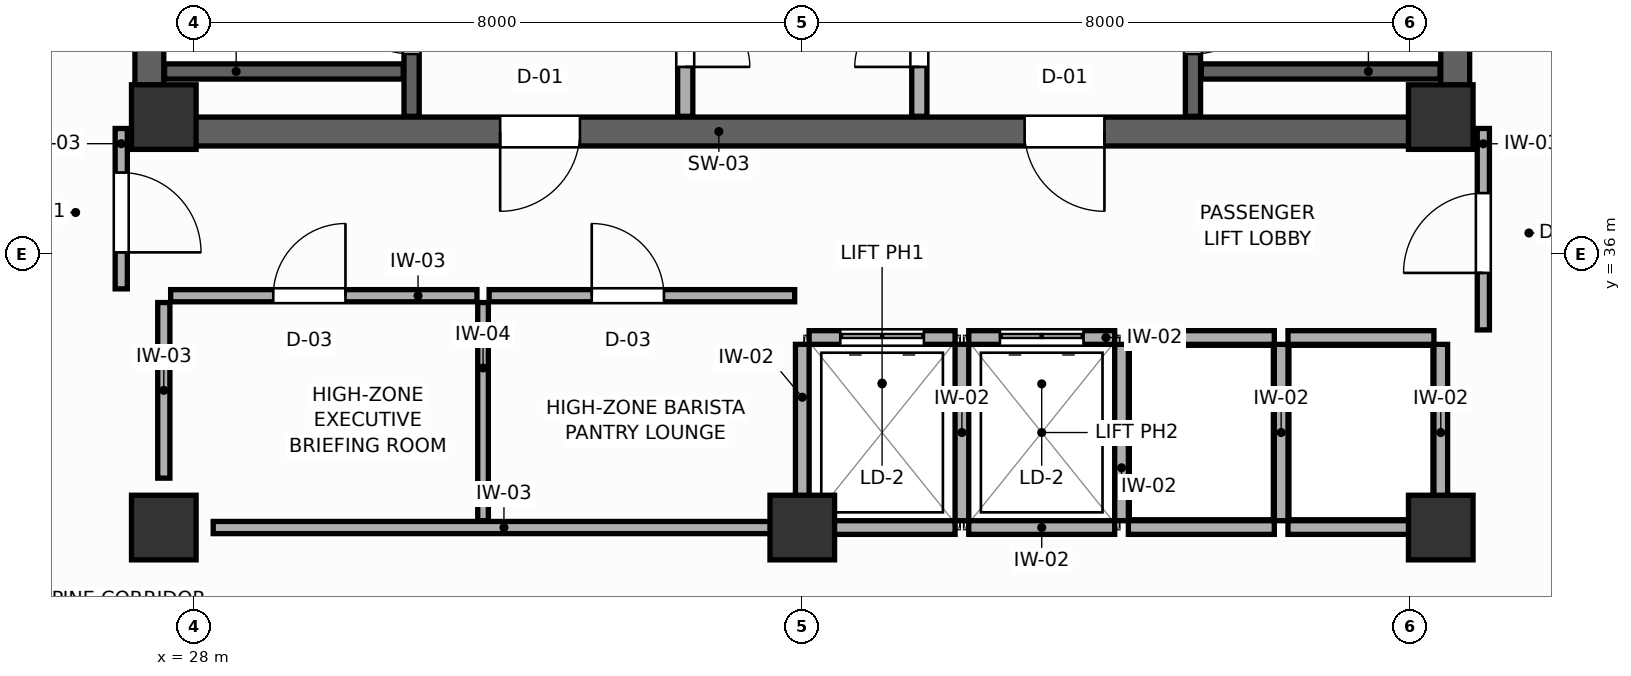
"""IFC4 building model, lengths in metres.
Left out: names, types, materials, properties, quantities, classifications, styles, units other than length and angle.
Written with IfcOpenShell. Run it as: python <this file> out.ifc"""

import sys

from ifc_helpers import new_model, si_unit, direction, frame, frame_2d, origin, origin_2d, place, context, subcontext, project, spatial, rectangle, extrude, source, transform, mapped, element, fill, save


model = new_model("IFC4")
c1 = context("Model", 3, precision=1e-05, world=origin(), true_north=direction((0.0, 1.0)))
c2 = subcontext(c1, "Body", "Model", "MODEL_VIEW")
j1 = project(units=[si_unit("LENGTHUNIT", "METRE"), si_unit("PLANEANGLEUNIT", "RADIAN")], contexts=[c1])
p1 = place(None, origin())
s1 = spatial("IfcSite", under=j1, at=p1, CompositionType="ELEMENT")
p2 = place(p1, origin())
s2 = spatial("IfcBuilding", under=s1, at=p2, CompositionType="ELEMENT")
p3 = place(p2, frame((0.0, 0.0, 253.8)))
s3 = spatial("IfcBuildingStorey", under=s2, at=p3, CompositionType="ELEMENT", Elevation=253.8)
p4 = place(p3, frame((27.22, 37.61, 0.0), z_axis=(0.0, 0.0, 1.0), x_axis=(1.0, 0.0, 0.0)))
e1 = element("IfcWall", 1, at=p4, inside=s3, PredefinedType="SHEAR", context=c2, shape_type="SweptSolid", body=[
    extrude(rectangle(XDim=17.56, YDim=0.38, at=frame_2d((8.78, 0.0))), origin(), (0.0, 0.0, 1.0), 3.6),
])
p5 = place(p4, frame((4.805, 0.0, 0.0)))
e2 = element("IfcOpeningElement", 2, at=p5, cuts=e1, PredefinedType="OPENING", context=c2, shape_type="SweptSolid", body=[
    extrude(rectangle(XDim=1.05, YDim=2.1, at=frame_2d((0.525, 1.05))), frame((0.0, 0.2, 0.0), z_axis=(0.0, -1.0, 0.0), x_axis=(1.0, 0.0, 0.0)), (0.0, 0.0, 1.0), 0.4),
])
p6 = place(p4, frame((11.705, 0.0, 0.0)))
e3 = element("IfcOpeningElement", 3, at=p6, cuts=e1, PredefinedType="OPENING", context=c2, shape_type="SweptSolid", body=[
    extrude(rectangle(XDim=1.05, YDim=2.1, at=frame_2d((0.525, 1.05))), frame((0.0, 0.2, 0.0), z_axis=(0.0, -1.0, 0.0), x_axis=(1.0, 0.0, 0.0)), (0.0, 0.0, 1.0), 0.4),
])
for number, where, z_axis, x_axis in (
    (4, (27.41, 37.8, 0.0), (0.0, 0.0, 1.0), (0.0, 1.0, 0.0)),
    (5, (44.59, 37.8, 0.0), (0.0, 0.0, 1.0), (0.0, 1.0, 0.0)),
):
    element("IfcWall", number, at=place(p3, frame(where, z_axis=z_axis, x_axis=x_axis)), inside=s3, PredefinedType="SHEAR", context=c2, shape_type="SweptSolid", body=[
        extrude(rectangle(XDim=9.0, YDim=0.38, at=frame_2d((4.5, 0.0))), origin(), (0.0, 0.0, 1.0), 3.6),
    ])
m1 = source(origin(), c2, "Body", "SweptSolid", [
    extrude(rectangle(XDim=0.85, YDim=0.85, at=origin_2d()), origin(), (0.0, 0.0, 1.0), 3.6),
])
for number, where, z_axis, x_axis in (
    (6, (27.6, 37.8, 0.0), (0.0, 0.0, 1.0), (1.0, 0.0, 0.0)),
    (7, (44.4, 37.8, 0.0), (0.0, 0.0, 1.0), (1.0, 0.0, 0.0)),
    (8, (27.6, 32.4, 0.0), (0.0, 0.0, 1.0), (1.0, 0.0, 0.0)),
    (9, (44.4, 32.4, 0.0), (0.0, 0.0, 1.0), (1.0, 0.0, 0.0)),
    (10, (36.0, 32.4, 0.0), (0.0, 0.0, 1.0), (1.0, 0.0, 0.0)),
):
    element("IfcColumn", number, at=place(p3, frame(where, z_axis=z_axis, x_axis=x_axis)), inside=s3, PredefinedType="COLUMN", context=c2, shape_type="MappedRepresentation", body=[
        mapped(m1, transform((0.0, 0.0, 0.0), scale=1.0)),
    ])
p7 = place(p3, frame((30.86, 37.81, 0.0), z_axis=(0.0, 0.0, 1.0), x_axis=(0.0, 1.0, 0.0)))
e11 = element("IfcWall", 11, at=p7, inside=s3, PredefinedType="SHEAR", context=c2, shape_type="SweptSolid", body=[
    extrude(rectangle(XDim=8.98, YDim=0.2, at=frame_2d((4.49, 0.0))), origin(), (0.0, 0.0, 1.0), 3.6),
])
p8 = place(p7, frame((0.82, 0.0, 0.0)))
e12 = element("IfcOpeningElement", 12, at=p8, cuts=e11, PredefinedType="OPENING", context=c2, shape_type="SweptSolid", body=[
    extrude(rectangle(XDim=1.05, YDim=2.1, at=frame_2d((0.525, 1.05))), frame((0.0, 0.11, 0.0), z_axis=(0.0, -1.0, 0.0), x_axis=(1.0, 0.0, 0.0)), (0.0, 0.0, 1.0), 0.22),
])
p9 = place(p3, frame((27.61, 38.4, 0.0), z_axis=(0.0, 0.0, 1.0), x_axis=(1.0, 0.0, 0.0)))
e13 = element("IfcWall", 13, at=p9, inside=s3, PredefinedType="SHEAR", context=c2, shape_type="SweptSolid", body=[
    extrude(rectangle(XDim=3.14, YDim=0.2, at=frame_2d((1.57, 0.0))), origin(), (0.0, 0.0, 1.0), 3.6),
])
p10 = place(p3, frame((41.14, 37.81, 0.0), z_axis=(0.0, 0.0, 1.0), x_axis=(0.0, 1.0, 0.0)))
e14 = element("IfcWall", 14, at=p10, inside=s3, PredefinedType="SHEAR", context=c2, shape_type="SweptSolid", body=[
    extrude(rectangle(XDim=8.98, YDim=0.2, at=frame_2d((4.49, 0.0))), origin(), (0.0, 0.0, 1.0), 3.6),
])
p11 = place(p10, frame((0.82, 0.0, 0.0)))
e15 = element("IfcOpeningElement", 15, at=p11, cuts=e14, PredefinedType="OPENING", context=c2, shape_type="SweptSolid", body=[
    extrude(rectangle(XDim=1.05, YDim=2.1, at=frame_2d((0.525, 1.05))), frame((0.0, 0.11, 0.0), z_axis=(0.0, -1.0, 0.0), x_axis=(1.0, 0.0, 0.0)), (0.0, 0.0, 1.0), 0.22),
])
p12 = place(p3, frame((41.25, 38.4, 0.0), z_axis=(0.0, 0.0, 1.0), x_axis=(1.0, 0.0, 0.0)))
e16 = element("IfcWall", 16, at=p12, inside=s3, PredefinedType="SHEAR", context=c2, shape_type="SweptSolid", body=[
    extrude(rectangle(XDim=3.14, YDim=0.2, at=frame_2d((1.57, 0.0))), origin(), (0.0, 0.0, 1.0), 3.6),
])
p13 = place(p3, frame((34.46, 37.81, 0.0), z_axis=(0.0, 0.0, 1.0), x_axis=(0.0, 1.0, 0.0)))
e17 = element("IfcWall", 17, at=p13, inside=s3, PredefinedType="PARTITIONING", context=c2, shape_type="SweptSolid", body=[
    extrude(rectangle(XDim=8.98, YDim=0.2, at=frame_2d((4.49, 0.0))), origin(), (0.0, 0.0, 1.0), 3.41),
])
p14 = place(p13, frame((0.65, 0.0, 0.0)))
e18 = element("IfcOpeningElement", 18, at=p14, cuts=e17, PredefinedType="OPENING", context=c2, shape_type="SweptSolid", body=[
    extrude(rectangle(XDim=0.85, YDim=2.05, at=frame_2d((0.425, 1.025))), frame((0.0, 0.11, 0.0), z_axis=(0.0, -1.0, 0.0), x_axis=(1.0, 0.0, 0.0)), (0.0, 0.0, 1.0), 0.22),
])
p15 = place(p3, frame((37.54, 37.81, 0.0), z_axis=(0.0, 0.0, 1.0), x_axis=(0.0, 1.0, 0.0)))
e19 = element("IfcWall", 19, at=p15, inside=s3, PredefinedType="PARTITIONING", context=c2, shape_type="SweptSolid", body=[
    extrude(rectangle(XDim=8.98, YDim=0.2, at=frame_2d((4.49, 0.0))), origin(), (0.0, 0.0, 1.0), 3.41),
])
p16 = place(p15, frame((0.65, 0.0, 0.0)))
e20 = element("IfcOpeningElement", 20, at=p16, cuts=e19, PredefinedType="OPENING", context=c2, shape_type="SweptSolid", body=[
    extrude(rectangle(XDim=0.85, YDim=2.05, at=frame_2d((0.425, 1.025))), frame((0.0, 0.11, 0.0), z_axis=(0.0, -1.0, 0.0), x_axis=(1.0, 0.0, 0.0)), (0.0, 0.0, 1.0), 0.22),
])
p17 = place(p3, frame((36.09, 34.9, 0.0), z_axis=(0.0, 0.0, 1.0), x_axis=(1.0, 0.0, 0.0)))
e21 = element("IfcWall", 21, at=p17, inside=s3, PredefinedType="PARTITIONING", context=c2, shape_type="SweptSolid", body=[
    extrude(rectangle(XDim=1.92, YDim=0.18, at=frame_2d((0.96, 0.0))), origin(), (0.0, 0.0, 1.0), 3.41),
])
p18 = place(p17, frame((0.41, 0.0, 0.0)))
e22 = element("IfcOpeningElement", 22, at=p18, cuts=e21, PredefinedType="OPENING", context=c2, shape_type="SweptSolid", body=[
    extrude(rectangle(XDim=1.1, YDim=2.1, at=frame_2d((0.55, 1.05))), frame((0.0, 0.1, 0.0), z_axis=(0.0, -1.0, 0.0), x_axis=(1.0, 0.0, 0.0)), (0.0, 0.0, 1.0), 0.2),
])
p19 = place(p3, frame((36.09, 32.4, 0.0), z_axis=(0.0, 0.0, 1.0), x_axis=(1.0, 0.0, 0.0)))
e23 = element("IfcWall", 23, at=p19, inside=s3, PredefinedType="PARTITIONING", context=c2, shape_type="SweptSolid", body=[
    extrude(rectangle(XDim=1.92, YDim=0.18, at=frame_2d((0.96, 0.0))), origin(), (0.0, 0.0, 1.0), 2.17),
])
p20 = place(p3, frame((36.0, 32.49, 0.0), z_axis=(0.0, 0.0, 1.0), x_axis=(0.0, 1.0, 0.0)))
e24 = element("IfcWall", 24, at=p20, inside=s3, PredefinedType="PARTITIONING", context=c2, shape_type="SweptSolid", body=[
    extrude(rectangle(XDim=2.32, YDim=0.18, at=frame_2d((1.16, 0.0))), origin(), (0.0, 0.0, 1.0), 3.41),
])
p21 = place(p3, frame((38.19, 34.9, 0.0), z_axis=(0.0, 0.0, 1.0), x_axis=(1.0, 0.0, 0.0)))
e25 = element("IfcWall", 25, at=p21, inside=s3, PredefinedType="PARTITIONING", context=c2, shape_type="SweptSolid", body=[
    extrude(rectangle(XDim=1.92, YDim=0.18, at=frame_2d((0.96, 0.0))), origin(), (0.0, 0.0, 1.0), 3.41),
])
p22 = place(p21, frame((0.41, 0.0, 0.0)))
e26 = element("IfcOpeningElement", 26, at=p22, cuts=e25, PredefinedType="OPENING", context=c2, shape_type="SweptSolid", body=[
    extrude(rectangle(XDim=1.1, YDim=2.1, at=frame_2d((0.55, 1.05))), frame((0.0, 0.1, 0.0), z_axis=(0.0, -1.0, 0.0), x_axis=(1.0, 0.0, 0.0)), (0.0, 0.0, 1.0), 0.2),
])
p23 = place(p3, frame((38.19, 32.4, 0.0), z_axis=(0.0, 0.0, 1.0), x_axis=(1.0, 0.0, 0.0)))
e27 = element("IfcWall", 27, at=p23, inside=s3, PredefinedType="PARTITIONING", context=c2, shape_type="SweptSolid", body=[
    extrude(rectangle(XDim=1.92, YDim=0.18, at=frame_2d((0.96, 0.0))), origin(), (0.0, 0.0, 1.0), 2.17),
])
p24 = place(p3, frame((38.1, 32.49, 0.0), z_axis=(0.0, 0.0, 1.0), x_axis=(0.0, 1.0, 0.0)))
e28 = element("IfcWall", 28, at=p24, inside=s3, PredefinedType="PARTITIONING", context=c2, shape_type="SweptSolid", body=[
    extrude(rectangle(XDim=2.32, YDim=0.18, at=frame_2d((1.16, 0.0))), origin(), (0.0, 0.0, 1.0), 3.41),
])
p25 = place(p3, frame((40.29, 34.9, 0.0), z_axis=(0.0, 0.0, 1.0), x_axis=(1.0, 0.0, 0.0)))
e29 = element("IfcWall", 29, at=p25, inside=s3, PredefinedType="PARTITIONING", context=c2, shape_type="SweptSolid", body=[
    extrude(rectangle(XDim=1.92, YDim=0.18, at=frame_2d((0.96, 0.0))), origin(), (0.0, 0.0, 1.0), 3.41),
])
p26 = place(p3, frame((40.29, 32.4, 0.0), z_axis=(0.0, 0.0, 1.0), x_axis=(1.0, 0.0, 0.0)))
e30 = element("IfcWall", 30, at=p26, inside=s3, PredefinedType="PARTITIONING", context=c2, shape_type="SweptSolid", body=[
    extrude(rectangle(XDim=1.92, YDim=0.18, at=frame_2d((0.96, 0.0))), origin(), (0.0, 0.0, 1.0), 2.17),
])
p27 = place(p3, frame((40.2, 32.49, 0.0), z_axis=(0.0, 0.0, 1.0), x_axis=(0.0, 1.0, 0.0)))
e31 = element("IfcWall", 31, at=p27, inside=s3, PredefinedType="PARTITIONING", context=c2, shape_type="SweptSolid", body=[
    extrude(rectangle(XDim=2.32, YDim=0.18, at=frame_2d((1.16, 0.0))), origin(), (0.0, 0.0, 1.0), 3.41),
])
p28 = place(p3, frame((42.39, 34.9, 0.0), z_axis=(0.0, 0.0, 1.0), x_axis=(1.0, 0.0, 0.0)))
e32 = element("IfcWall", 32, at=p28, inside=s3, PredefinedType="PARTITIONING", context=c2, shape_type="SweptSolid", body=[
    extrude(rectangle(XDim=1.92, YDim=0.18, at=frame_2d((0.96, 0.0))), origin(), (0.0, 0.0, 1.0), 3.41),
])
p29 = place(p3, frame((42.39, 32.4, 0.0), z_axis=(0.0, 0.0, 1.0), x_axis=(1.0, 0.0, 0.0)))
e33 = element("IfcWall", 33, at=p29, inside=s3, PredefinedType="PARTITIONING", context=c2, shape_type="SweptSolid", body=[
    extrude(rectangle(XDim=1.92, YDim=0.18, at=frame_2d((0.96, 0.0))), origin(), (0.0, 0.0, 1.0), 2.17),
])
for number, where, z_axis, x_axis in (
    (34, (42.3, 32.49, 0.0), (0.0, 0.0, 1.0), (0.0, 1.0, 0.0)),
    (35, (44.4, 32.49, 0.0), (0.0, 0.0, 1.0), (0.0, 1.0, 0.0)),
):
    element("IfcWall", number, at=place(p3, frame(where, z_axis=z_axis, x_axis=x_axis)), inside=s3, PredefinedType="PARTITIONING", context=c2, shape_type="SweptSolid", body=[
        extrude(rectangle(XDim=2.32, YDim=0.18, at=frame_2d((1.16, 0.0))), origin(), (0.0, 0.0, 1.0), 3.41),
    ])
p30 = place(p3, frame((28.25, 32.4, 0.0), z_axis=(0.0, 0.0, 1.0), x_axis=(1.0, 0.0, 0.0)))
e36 = element("IfcWall", 36, at=p30, inside=s3, PredefinedType="PARTITIONING", context=c2, shape_type="SweptSolid", body=[
    extrude(rectangle(XDim=7.65, YDim=0.16, at=frame_2d((3.825, 0.0))), origin(), (0.0, 0.0, 1.0), 2.17),
])
p31 = place(p3, frame((27.6, 33.05, 0.0), z_axis=(0.0, 0.0, 1.0), x_axis=(0.0, 1.0, 0.0)))
e37 = element("IfcWall", 37, at=p31, inside=s3, PredefinedType="PARTITIONING", context=c2, shape_type="SweptSolid", body=[
    extrude(rectangle(XDim=2.31, YDim=0.16, at=frame_2d((1.155, 0.0))), origin(), (0.0, 0.0, 1.0), 3.41),
])
p32 = place(p3, frame((31.8, 32.49, 0.0), z_axis=(0.0, 0.0, 1.0), x_axis=(0.0, 1.0, 0.0)))
e38 = element("IfcWall", 38, at=p32, inside=s3, PredefinedType="PARTITIONING", context=c2, shape_type="SweptSolid", body=[
    extrude(rectangle(XDim=2.87, YDim=0.14, at=frame_2d((1.435, 0.0))), origin(), (0.0, 0.0, 1.0), 3.41),
])
p33 = place(p3, frame((27.69, 35.45, 0.0), z_axis=(0.0, 0.0, 1.0), x_axis=(1.0, 0.0, 0.0)))
e39 = element("IfcWall", 39, at=p33, inside=s3, PredefinedType="PARTITIONING", context=c2, shape_type="SweptSolid", body=[
    extrude(rectangle(XDim=4.03, YDim=0.16, at=frame_2d((2.015, 0.0))), origin(), (0.0, 0.0, 1.0), 3.41),
])
p34 = place(p33, frame((1.35, 0.0, 0.0)))
e40 = element("IfcOpeningElement", 40, at=p34, cuts=e39, PredefinedType="OPENING", context=c2, shape_type="SweptSolid", body=[
    extrude(rectangle(XDim=0.95, YDim=2.05, at=frame_2d((0.475, 1.025))), frame((0.0, 0.09, 0.0), z_axis=(0.0, -1.0, 0.0), x_axis=(1.0, 0.0, 0.0)), (0.0, 0.0, 1.0), 0.18),
])
p35 = place(p3, frame((31.88, 35.45, 0.0), z_axis=(0.0, 0.0, 1.0), x_axis=(1.0, 0.0, 0.0)))
e41 = element("IfcWall", 41, at=p35, inside=s3, PredefinedType="PARTITIONING", context=c2, shape_type="SweptSolid", body=[
    extrude(rectangle(XDim=4.02, YDim=0.16, at=frame_2d((2.01, 0.0))), origin(), (0.0, 0.0, 1.0), 3.41),
])
p36 = place(p35, frame((1.35, 0.0, 0.0)))
e42 = element("IfcOpeningElement", 42, at=p36, cuts=e41, PredefinedType="OPENING", context=c2, shape_type="SweptSolid", body=[
    extrude(rectangle(XDim=0.95, YDim=2.05, at=frame_2d((0.475, 1.025))), frame((0.0, 0.09, 0.0), z_axis=(0.0, -1.0, 0.0), x_axis=(1.0, 0.0, 0.0)), (0.0, 0.0, 1.0), 0.18),
])
p37 = place(p3, frame((27.04, 35.54, 0.0), z_axis=(0.0, 0.0, 1.0), x_axis=(0.0, 1.0, 0.0)))
e43 = element("IfcWall", 43, at=p37, inside=s3, PredefinedType="PARTITIONING", context=c2, shape_type="SweptSolid", body=[
    extrude(rectangle(XDim=2.11, YDim=0.16, at=frame_2d((1.055, 0.0))), origin(), (0.0, 0.0, 1.0), 3.41),
])
p38 = place(p37, frame((0.48, 0.0, 0.0)))
e44 = element("IfcOpeningElement", 44, at=p38, cuts=e43, PredefinedType="OPENING", context=c2, shape_type="SweptSolid", body=[
    extrude(rectangle(XDim=1.05, YDim=2.1, at=frame_2d((0.525, 1.05))), frame((0.0, 0.09, 0.0), z_axis=(0.0, -1.0, 0.0), x_axis=(1.0, 0.0, 0.0)), (0.0, 0.0, 1.0), 0.18),
])
p39 = place(p3, frame((44.96, 35.0, 0.0), z_axis=(0.0, 0.0, 1.0), x_axis=(0.0, 1.0, 0.0)))
e45 = element("IfcWall", 45, at=p39, inside=s3, PredefinedType="PARTITIONING", context=c2, shape_type="SweptSolid", body=[
    extrude(rectangle(XDim=2.65, YDim=0.16, at=frame_2d((1.325, 0.0))), origin(), (0.0, 0.0, 1.0), 3.41),
])
p40 = place(p39, frame((0.75, 0.0, 0.0)))
e46 = element("IfcOpeningElement", 46, at=p40, cuts=e45, PredefinedType="OPENING", context=c2, shape_type="SweptSolid", body=[
    extrude(rectangle(XDim=1.05, YDim=2.1, at=frame_2d((0.525, 1.05))), frame((0.0, 0.09, 0.0), z_axis=(0.0, -1.0, 0.0), x_axis=(1.0, 0.0, 0.0)), (0.0, 0.0, 1.0), 0.18),
])
p41 = place(p8, origin())
e47 = element("IfcDoor", 47, at=p41, inside=s3, OperationType="SINGLE_SWING_RIGHT", PredefinedType="DOOR", context=c2, shape_type="SweptSolid", body=[
    extrude(rectangle(XDim=1.05, YDim=2.1, at=frame_2d((0.525, 1.05))), frame((0.0, 0.025, 0.0), z_axis=(0.0, -1.0, 0.0), x_axis=(1.0, 0.0, 0.0)), (0.0, 0.0, 1.0), 0.05),
])
fill(e12, e47)
p42 = place(p11, frame((1.05, 0.0, 0.0), z_axis=(0.0, 0.0, 1.0), x_axis=(-1.0, 0.0, 0.0)))
e48 = element("IfcDoor", 48, at=p42, inside=s3, OperationType="SINGLE_SWING_LEFT", PredefinedType="DOOR", context=c2, shape_type="SweptSolid", body=[
    extrude(rectangle(XDim=1.05, YDim=2.1, at=frame_2d((0.525, 1.05))), frame((0.0, 0.025, 0.0), z_axis=(0.0, -1.0, 0.0), x_axis=(1.0, 0.0, 0.0)), (0.0, 0.0, 1.0), 0.05),
])
fill(e15, e48)
p43 = place(p14, frame((0.85, 0.0, 0.0), z_axis=(0.0, 0.0, 1.0), x_axis=(-1.0, 0.0, 0.0)))
e49 = element("IfcDoor", 49, at=p43, inside=s3, OperationType="SINGLE_SWING_RIGHT", PredefinedType="DOOR", context=c2, shape_type="SweptSolid", body=[
    extrude(rectangle(XDim=0.85, YDim=2.05, at=frame_2d((0.425, 1.025))), frame((0.0, 0.025, 0.0), z_axis=(0.0, -1.0, 0.0), x_axis=(1.0, 0.0, 0.0)), (0.0, 0.0, 1.0), 0.05),
])
fill(e18, e49)
p44 = place(p16, origin())
e50 = element("IfcDoor", 50, at=p44, inside=s3, OperationType="SINGLE_SWING_LEFT", PredefinedType="DOOR", context=c2, shape_type="SweptSolid", body=[
    extrude(rectangle(XDim=0.85, YDim=2.05, at=frame_2d((0.425, 1.025))), frame((0.0, 0.025, 0.0), z_axis=(0.0, -1.0, 0.0), x_axis=(1.0, 0.0, 0.0)), (0.0, 0.0, 1.0), 0.05),
])
fill(e20, e50)
p45 = place(p18, origin())
e51 = element("IfcDoor", 51, at=p45, inside=s3, OperationType="DOUBLE_DOOR_SLIDING", PredefinedType="DOOR", context=c2, shape_type="SweptSolid", body=[
    extrude(rectangle(XDim=1.1, YDim=2.1, at=frame_2d((0.55, 1.05))), frame((0.0, 0.025, 0.0), z_axis=(0.0, -1.0, 0.0), x_axis=(1.0, 0.0, 0.0)), (0.0, 0.0, 1.0), 0.05),
])
fill(e22, e51)
p46 = place(p22, origin())
e52 = element("IfcDoor", 52, at=p46, inside=s3, OperationType="DOUBLE_DOOR_SLIDING", PredefinedType="DOOR", context=c2, shape_type="SweptSolid", body=[
    extrude(rectangle(XDim=1.1, YDim=2.1, at=frame_2d((0.55, 1.05))), frame((0.0, 0.025, 0.0), z_axis=(0.0, -1.0, 0.0), x_axis=(1.0, 0.0, 0.0)), (0.0, 0.0, 1.0), 0.05),
])
fill(e26, e52)
p47 = place(p34, origin())
e53 = element("IfcDoor", 53, at=p47, inside=s3, OperationType="SINGLE_SWING_RIGHT", PredefinedType="DOOR", context=c2, shape_type="SweptSolid", body=[
    extrude(rectangle(XDim=0.95, YDim=2.05, at=frame_2d((0.475, 1.025))), frame((0.0, 0.025, 0.0), z_axis=(0.0, -1.0, 0.0), x_axis=(1.0, 0.0, 0.0)), (0.0, 0.0, 1.0), 0.05),
])
fill(e40, e53)
p48 = place(p36, origin())
e54 = element("IfcDoor", 54, at=p48, inside=s3, OperationType="SINGLE_SWING_LEFT", PredefinedType="DOOR", context=c2, shape_type="SweptSolid", body=[
    extrude(rectangle(XDim=0.95, YDim=2.05, at=frame_2d((0.475, 1.025))), frame((0.0, 0.025, 0.0), z_axis=(0.0, -1.0, 0.0), x_axis=(1.0, 0.0, 0.0)), (0.0, 0.0, 1.0), 0.05),
])
fill(e42, e54)
p49 = place(p38, frame((1.05, 0.0, 0.0), z_axis=(0.0, 0.0, 1.0), x_axis=(-1.0, 0.0, 0.0)))
e55 = element("IfcDoor", 55, at=p49, inside=s3, OperationType="SINGLE_SWING_RIGHT", PredefinedType="DOOR", context=c2, shape_type="SweptSolid", body=[
    extrude(rectangle(XDim=1.05, YDim=2.1, at=frame_2d((0.525, 1.05))), frame((0.0, 0.025, 0.0), z_axis=(0.0, -1.0, 0.0), x_axis=(1.0, 0.0, 0.0)), (0.0, 0.0, 1.0), 0.05),
])
fill(e44, e55)
p50 = place(p40, origin())
e56 = element("IfcDoor", 56, at=p50, inside=s3, OperationType="SINGLE_SWING_LEFT", PredefinedType="DOOR", context=c2, shape_type="SweptSolid", body=[
    extrude(rectangle(XDim=1.05, YDim=2.1, at=frame_2d((0.525, 1.05))), frame((0.0, 0.025, 0.0), z_axis=(0.0, -1.0, 0.0), x_axis=(1.0, 0.0, 0.0)), (0.0, 0.0, 1.0), 0.05),
])
fill(e46, e56)
p51 = place(p5, frame((1.05, 0.0, 0.0), z_axis=(0.0, 0.0, 1.0), x_axis=(-1.0, 0.0, 0.0)))
e57 = element("IfcDoor", 57, at=p51, inside=s3, OperationType="SINGLE_SWING_RIGHT", PredefinedType="DOOR", context=c2, shape_type="SweptSolid", body=[
    extrude(rectangle(XDim=1.05, YDim=2.1, at=frame_2d((0.525, 1.05))), frame((0.0, 0.025, 0.0), z_axis=(0.0, -1.0, 0.0), x_axis=(1.0, 0.0, 0.0)), (0.0, 0.0, 1.0), 0.05),
])
fill(e2, e57)
p52 = place(p6, frame((1.05, 0.0, 0.0), z_axis=(0.0, 0.0, 1.0), x_axis=(-1.0, 0.0, 0.0)))
e58 = element("IfcDoor", 58, at=p52, inside=s3, OperationType="SINGLE_SWING_LEFT", PredefinedType="DOOR", context=c2, shape_type="SweptSolid", body=[
    extrude(rectangle(XDim=1.05, YDim=2.1, at=frame_2d((0.525, 1.05))), frame((0.0, 0.025, 0.0), z_axis=(0.0, -1.0, 0.0), x_axis=(1.0, 0.0, 0.0)), (0.0, 0.0, 1.0), 0.05),
])
fill(e3, e58)
save(model, sys.argv[1])
